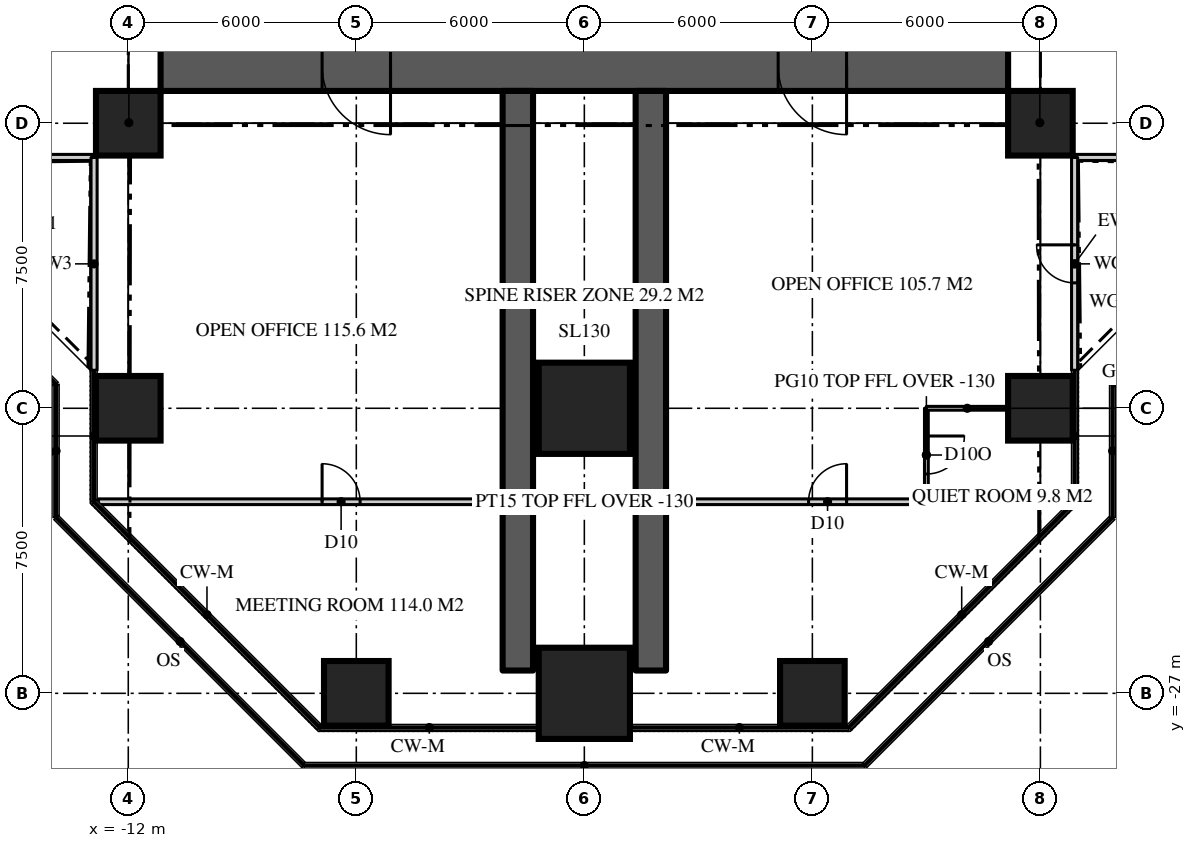
"""IFC4 building model, lengths in metres.
Left out: names, types, materials, properties, quantities, classifications, styles, units other than length and angle.
Written with IfcOpenShell. Run it as: python <this file> out.ifc"""

import sys

from ifc_helpers import new_model, si_unit, direction, frame, frame_2d, origin, origin_2d, place, context, subcontext, project, spatial, rectangle, extrude, element, fill, save


model = new_model("IFC4")
c1 = context("Model", 3, precision=1e-05, world=origin(), true_north=direction((0.0, 1.0)))
c2 = subcontext(c1, "Body", "Model", "MODEL_VIEW")
j1 = project(units=[si_unit("LENGTHUNIT", "METRE"), si_unit("PLANEANGLEUNIT", "RADIAN")], contexts=[c1])
p1 = place(None, origin())
s1 = spatial("IfcSite", under=j1, at=p1, CompositionType="ELEMENT")
p2 = place(p1, origin())
s2 = spatial("IfcBuilding", under=s1, at=p2, CompositionType="ELEMENT")
p3 = place(p2, frame((0.0, 0.0, 128.1)))
s3 = spatial("IfcBuildingStorey", under=s2, at=p3, CompositionType="ELEMENT", Elevation=128.1)
p4 = place(p3, frame((11.15, -10.5, 0.0), z_axis=(0.0, 0.0, 1.0), x_axis=(-1.0, 0.0, 0.0)))
e1 = element("IfcWall", 1, at=p4, inside=s3, PredefinedType="SHEAR", context=c2, shape_type="SweptSolid", body=[
    extrude(rectangle(XDim=22.3, YDim=1.3, at=frame_2d((11.15, 0.0))), origin(), (0.0, 0.0, 1.0), 3.9),
])
p5 = place(p4, frame((16.25, 0.0, 0.0)))
e2 = element("IfcOpeningElement", 2, at=p5, cuts=e1, PredefinedType="OPENING", context=c2, shape_type="SweptSolid", body=[
    extrude(rectangle(XDim=1.8, YDim=2.2, at=frame_2d((0.9, 1.1))), frame((0.0, 0.66, 0.0), z_axis=(0.0, -1.0, 0.0), x_axis=(1.0, 0.0, 0.0)), (0.0, 0.0, 1.0), 1.32),
])
p6 = place(p4, frame((4.25, 0.0, 0.0)))
e3 = element("IfcOpeningElement", 3, at=p6, cuts=e1, PredefinedType="OPENING", context=c2, shape_type="SweptSolid", body=[
    extrude(rectangle(XDim=1.8, YDim=2.2, at=frame_2d((0.9, 1.1))), frame((0.0, 0.66, 0.0), z_axis=(0.0, -1.0, 0.0), x_axis=(1.0, 0.0, 0.0)), (0.0, 0.0, 1.0), 1.32),
])
for number, where, z_axis, x_axis in (
    (4, (-1.75, -11.15, 0.0), (0.0, 0.0, 1.0), (0.0, -1.0, 0.0)),
    (5, (1.75, -11.15, 0.0), (0.0, 0.0, 1.0), (0.0, -1.0, 0.0)),
):
    element("IfcWall", number, at=place(p3, frame(where, z_axis=z_axis, x_axis=x_axis)), inside=s3, PredefinedType="SHEAR", context=c2, shape_type="SweptSolid", body=[
        extrude(rectangle(XDim=15.25, YDim=0.8, at=frame_2d((7.625, 0.0))), origin(), (0.0, 0.0, 1.0), 3.9),
    ])
p7 = place(p3, frame((-6.0, -27.0, 0.0), z_axis=(0.0, 0.0, 1.0), x_axis=(1.0, 0.0, 0.0)))
e6 = element("IfcColumn", 6, at=p7, inside=s3, PredefinedType="COLUMN", context=c2, shape_type="SweptSolid", body=[
    extrude(rectangle(XDim=1.7, YDim=1.7, at=origin_2d()), origin(), (0.0, 0.0, 1.0), 3.9),
])
p8 = place(p3, frame((0.0, -27.0, 0.0), z_axis=(0.0, 0.0, 1.0), x_axis=(1.0, 0.0, 0.0)))
e7 = element("IfcColumn", 7, at=p8, inside=s3, PredefinedType="COLUMN", context=c2, shape_type="SweptSolid", body=[
    extrude(rectangle(XDim=2.4, YDim=2.4, at=origin_2d()), origin(), (0.0, 0.0, 1.0), 3.9),
])
for number, where, z_axis, x_axis in (
    (8, (6.0, -27.0, 0.0), (0.0, 0.0, 1.0), (1.0, 0.0, 0.0)),
    (9, (-12.0, -19.5, 0.0), (0.0, 0.0, 1.0), (1.0, 0.0, 0.0)),
):
    element("IfcColumn", number, at=place(p3, frame(where, z_axis=z_axis, x_axis=x_axis)), inside=s3, PredefinedType="COLUMN", context=c2, shape_type="SweptSolid", body=[
        extrude(rectangle(XDim=1.7, YDim=1.7, at=origin_2d()), origin(), (0.0, 0.0, 1.0), 3.9),
    ])
p9 = place(p3, frame((0.0, -19.5, 0.0), z_axis=(0.0, 0.0, 1.0), x_axis=(1.0, 0.0, 0.0)))
e10 = element("IfcColumn", 10, at=p9, inside=s3, PredefinedType="COLUMN", context=c2, shape_type="SweptSolid", body=[
    extrude(rectangle(XDim=2.4, YDim=2.4, at=origin_2d()), origin(), (0.0, 0.0, 1.0), 3.9),
])
for number, where, z_axis, x_axis in (
    (11, (12.0, -19.5, 0.0), (0.0, 0.0, 1.0), (1.0, 0.0, 0.0)),
    (12, (-12.0, -12.0, 0.0), (0.0, 0.0, 1.0), (1.0, 0.0, 0.0)),
    (13, (12.0, -12.0, 0.0), (0.0, 0.0, 1.0), (1.0, 0.0, 0.0)),
):
    element("IfcColumn", number, at=place(p3, frame(where, z_axis=z_axis, x_axis=x_axis)), inside=s3, PredefinedType="COLUMN", context=c2, shape_type="SweptSolid", body=[
        extrude(rectangle(XDim=1.7, YDim=1.7, at=origin_2d()), origin(), (0.0, 0.0, 1.0), 3.9),
    ])
p10 = place(p3, frame((12.9, -12.9, 0.0), z_axis=(0.0, 0.0, 1.0), x_axis=(1.0, 0.0, 0.0)))
e14 = element("IfcWall", 14, at=p10, inside=s3, PredefinedType="SOLIDWALL", context=c2, shape_type="SweptSolid", body=[
    extrude(rectangle(XDim=5.6, YDim=0.16, at=frame_2d((2.8, 0.0))), origin(), (0.0, 0.0, 1.0), 3.77),
])
p11 = place(p3, frame((-18.5, -12.9, 0.0), z_axis=(0.0, 0.0, 1.0), x_axis=(1.0, 0.0, 0.0)))
e15 = element("IfcWall", 15, at=p11, inside=s3, PredefinedType="SOLIDWALL", context=c2, shape_type="SweptSolid", body=[
    extrude(rectangle(XDim=5.6, YDim=0.16, at=frame_2d((2.8, 0.0))), origin(), (0.0, 0.0, 1.0), 3.77),
])
p12 = place(p11, frame((2.3, 0.0, 0.0)))
e16 = element("IfcOpeningElement", 16, at=p12, cuts=e15, PredefinedType="OPENING", context=c2, shape_type="SweptSolid", body=[
    extrude(rectangle(XDim=1.0, YDim=2.2, at=frame_2d((0.5, 1.1))), frame((0.0, 0.09, 0.0), z_axis=(0.0, -1.0, 0.0), x_axis=(1.0, 0.0, 0.0)), (0.0, 0.0, 1.0), 0.18),
])
p13 = place(p3, frame((-12.9, -12.9, 0.0), z_axis=(0.0, 0.0, 1.0), x_axis=(0.0, -1.0, 0.0)))
e17 = element("IfcWall", 17, at=p13, inside=s3, PredefinedType="SOLIDWALL", context=c2, shape_type="SweptSolid", body=[
    extrude(rectangle(XDim=5.6, YDim=0.16, at=frame_2d((2.8, 0.0))), origin(), (0.0, 0.0, 1.0), 3.77),
])
p14 = place(p3, frame((12.9, -18.5, 0.0), z_axis=(0.0, 0.0, 1.0), x_axis=(0.0, 1.0, 0.0)))
e18 = element("IfcWall", 18, at=p14, inside=s3, PredefinedType="SOLIDWALL", context=c2, shape_type="SweptSolid", body=[
    extrude(rectangle(XDim=5.6, YDim=0.16, at=frame_2d((2.8, 0.0))), origin(), (0.0, 0.0, 1.0), 3.77),
])
p15 = place(p14, frame((2.3, 0.0, 0.0)))
e19 = element("IfcOpeningElement", 19, at=p15, cuts=e18, PredefinedType="OPENING", context=c2, shape_type="SweptSolid", body=[
    extrude(rectangle(XDim=1.0, YDim=2.2, at=frame_2d((0.5, 1.1))), frame((0.0, 0.09, 0.0), z_axis=(0.0, -1.0, 0.0), x_axis=(1.0, 0.0, 0.0)), (0.0, 0.0, 1.0), 0.18),
])
p16 = place(p3, frame((-12.786, -21.959, 0.0), z_axis=(0.0, 0.0, 1.0), x_axis=(1.0, 0.0, 0.0)))
e20 = element("IfcWall", 20, at=p16, inside=s3, PredefinedType="PARTITIONING", context=c2, shape_type="SweptSolid", body=[
    extrude(rectangle(XDim=25.573, YDim=0.15, at=frame_2d((12.786, 0.0))), origin(), (0.0, 0.0, 1.0), 3.77),
])
p17 = place(p16, frame((18.687, 0.0, 0.0)))
e21 = element("IfcOpeningElement", 21, at=p17, cuts=e20, PredefinedType="OPENING", context=c2, shape_type="SweptSolid", body=[
    extrude(rectangle(XDim=1.0, YDim=2.2, at=frame_2d((0.5, 1.1))), frame((0.0, 0.085, 0.0), z_axis=(0.0, -1.0, 0.0), x_axis=(1.0, 0.0, 0.0)), (0.0, 0.0, 1.0), 0.17),
])
p18 = place(p16, frame((5.886, 0.0, 0.0)))
e22 = element("IfcOpeningElement", 22, at=p18, cuts=e20, PredefinedType="OPENING", context=c2, shape_type="SweptSolid", body=[
    extrude(rectangle(XDim=1.0, YDim=2.2, at=frame_2d((0.5, 1.1))), frame((0.0, 0.085, 0.0), z_axis=(0.0, -1.0, 0.0), x_axis=(1.0, 0.0, 0.0)), (0.0, 0.0, 1.0), 0.17),
])
p19 = place(p3, frame((9.0, -19.5, 0.0), z_axis=(0.0, 0.0, 1.0), x_axis=(0.0, -1.0, 0.0)))
e23 = element("IfcWall", 23, at=p19, inside=s3, PredefinedType="PARTITIONING", context=c2, shape_type="SweptSolid", body=[
    extrude(rectangle(XDim=2.459, YDim=0.1, at=frame_2d((1.229, 0.0))), origin(), (0.0, 0.0, 1.0), 3.77),
])
p20 = place(p19, frame((0.729, 0.0, 0.0)))
e24 = element("IfcOpeningElement", 24, at=p20, cuts=e23, PredefinedType="OPENING", context=c2, shape_type="SweptSolid", body=[
    extrude(rectangle(XDim=1.0, YDim=2.2, at=frame_2d((0.5, 1.1))), frame((0.0, 0.06, 0.0), z_axis=(0.0, -1.0, 0.0), x_axis=(1.0, 0.0, 0.0)), (0.0, 0.0, 1.0), 0.12),
])
p21 = place(p3, frame((9.0, -19.5, 0.0), z_axis=(0.0, 0.0, 1.0), x_axis=(1.0, 0.0, 0.0)))
e25 = element("IfcWall", 25, at=p21, inside=s3, PredefinedType="PARTITIONING", context=c2, shape_type="SweptSolid", body=[
    extrude(rectangle(XDim=2.15, YDim=0.1, at=frame_2d((1.075, 0.0))), origin(), (0.0, 0.0, 1.0), 2.77),
])
for number, where, z_axis, x_axis in (
    (26, (-11.15, -11.15, 0.0), (0.0, 0.0, 1.0), (-0.707, -0.707, 0.0)),
    (27, (11.15, -11.15, 0.0), (0.0, 0.0, 1.0), (0.707, -0.707, 0.0)),
):
    element("IfcWall", number, at=place(p3, frame(where, z_axis=z_axis, x_axis=x_axis)), inside=s3, PredefinedType="PARTITIONING", context=c2, shape_type="SweptSolid", body=[
        extrude(rectangle(XDim=2.362, YDim=0.15, at=frame_2d((1.181, 0.0))), origin(), (0.0, 0.0, 1.0), 3.22),
    ])
p22 = place(p15, origin())
e28 = element("IfcDoor", 28, at=p22, inside=s3, OperationType="SINGLE_SWING_RIGHT", PredefinedType="DOOR", context=c2, shape_type="SweptSolid", body=[
    extrude(rectangle(XDim=1.0, YDim=2.2, at=frame_2d((0.5, 1.1))), frame((0.0, 0.025, 0.0), z_axis=(0.0, -1.0, 0.0), x_axis=(1.0, 0.0, 0.0)), (0.0, 0.0, 1.0), 0.05),
])
fill(e19, e28)
p23 = place(p5, origin())
e29 = element("IfcDoor", 29, at=p23, inside=s3, OperationType="DOUBLE_DOOR_DOUBLE_SWING", PredefinedType="DOOR", context=c2, shape_type="SweptSolid", body=[
    extrude(rectangle(XDim=1.8, YDim=2.2, at=frame_2d((0.9, 1.1))), frame((0.0, 0.025, 0.0), z_axis=(0.0, -1.0, 0.0), x_axis=(1.0, 0.0, 0.0)), (0.0, 0.0, 1.0), 0.05),
])
fill(e2, e29)
p24 = place(p6, origin())
e30 = element("IfcDoor", 30, at=p24, inside=s3, OperationType="DOUBLE_DOOR_DOUBLE_SWING", PredefinedType="DOOR", context=c2, shape_type="SweptSolid", body=[
    extrude(rectangle(XDim=1.8, YDim=2.2, at=frame_2d((0.9, 1.1))), frame((0.0, 0.025, 0.0), z_axis=(0.0, -1.0, 0.0), x_axis=(1.0, 0.0, 0.0)), (0.0, 0.0, 1.0), 0.05),
])
fill(e3, e30)
p25 = place(p17, origin())
e31 = element("IfcDoor", 31, at=p25, inside=s3, OperationType="SINGLE_SWING_RIGHT", PredefinedType="DOOR", context=c2, shape_type="SweptSolid", body=[
    extrude(rectangle(XDim=1.0, YDim=2.2, at=frame_2d((0.5, 1.1))), frame((0.0, 0.025, 0.0), z_axis=(0.0, -1.0, 0.0), x_axis=(1.0, 0.0, 0.0)), (0.0, 0.0, 1.0), 0.05),
])
fill(e21, e31)
p26 = place(p18, origin())
e32 = element("IfcDoor", 32, at=p26, inside=s3, OperationType="SINGLE_SWING_LEFT", PredefinedType="DOOR", context=c2, shape_type="SweptSolid", body=[
    extrude(rectangle(XDim=1.0, YDim=2.2, at=frame_2d((0.5, 1.1))), frame((0.0, 0.025, 0.0), z_axis=(0.0, -1.0, 0.0), x_axis=(1.0, 0.0, 0.0)), (0.0, 0.0, 1.0), 0.05),
])
fill(e22, e32)
p27 = place(p20, origin())
e33 = element("IfcDoor", 33, at=p27, inside=s3, OperationType="SINGLE_SWING_LEFT", PredefinedType="DOOR", context=c2, shape_type="SweptSolid", body=[
    extrude(rectangle(XDim=1.0, YDim=2.2, at=frame_2d((0.5, 1.1))), frame((0.0, 0.025, 0.0), z_axis=(0.0, -1.0, 0.0), x_axis=(1.0, 0.0, 0.0)), (0.0, 0.0, 1.0), 0.05),
])
fill(e24, e33)
save(model, sys.argv[1])
